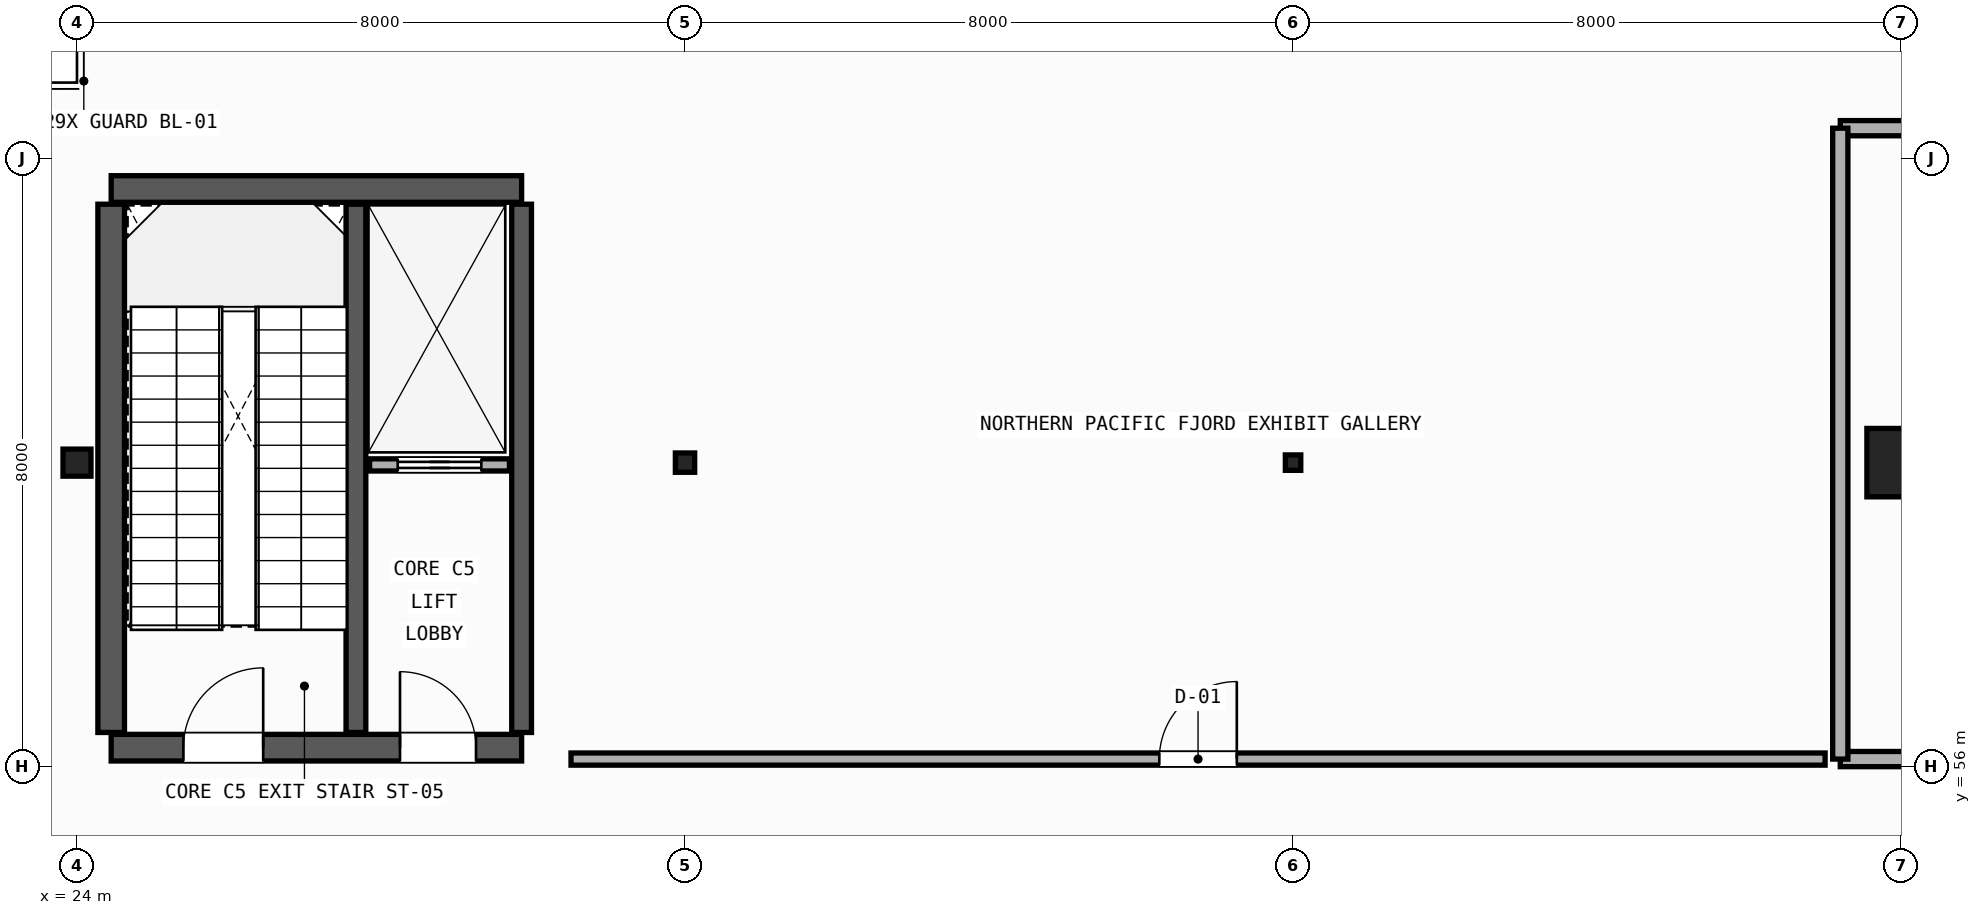
"""IFC4 building model, lengths in metres.
Left out: names, types, materials, properties, quantities, classifications, styles, units other than length and angle.
Written with IfcOpenShell. Run it as: python <this file> out.ifc"""

import sys

from ifc_helpers import new_model, si_unit, direction, frame, frame_2d, origin, origin_2d, place, context, subcontext, project, spatial, rectangle, hollow_rectangle, i_section, extrude, element, fill, save


model = new_model("IFC4")
c1 = context("Model", 3, precision=1e-05, world=origin(), true_north=direction((0.0, 1.0)))
c2 = subcontext(c1, "Body", "Model", "MODEL_VIEW")
j1 = project(units=[si_unit("LENGTHUNIT", "METRE"), si_unit("PLANEANGLEUNIT", "RADIAN")], contexts=[c1])
p1 = place(None, origin())
s1 = spatial("IfcSite", under=j1, at=p1, CompositionType="ELEMENT")
p2 = place(p1, origin())
s2 = spatial("IfcBuilding", under=s1, at=p2, CompositionType="ELEMENT")
p3 = place(p2, frame((0.0, 0.0, 5.4)))
s3 = spatial("IfcBuildingStorey", under=s2, at=p3, CompositionType="ELEMENT", Elevation=5.4)
p4 = place(p3, frame((24.0, 60.0, 0.0), z_axis=(0.0, 0.0, 1.0), x_axis=(1.0, 0.0, 0.0)))
e1 = element("IfcColumn", 1, at=p4, inside=s3, PredefinedType="COLUMN", context=c2, shape_type="SweptSolid", body=[
    extrude(i_section(OverallWidth=0.368, OverallDepth=0.356, WebThickness=0.011, FlangeThickness=0.018, FilletRadius=0.015, at=origin_2d()), origin(), (0.0, 0.0, 1.0), 4.56),
])
p5 = place(p3, frame((32.0, 60.0, 0.0), z_axis=(0.0, 0.0, 1.0), x_axis=(0.0, 1.0, 0.0)))
e2 = element("IfcColumn", 2, at=p5, inside=s3, PredefinedType="COLUMN", context=c2, shape_type="SweptSolid", body=[
    extrude(i_section(OverallWidth=0.254, OverallDepth=0.254, WebThickness=0.009, FlangeThickness=0.014, FilletRadius=0.011, at=origin_2d()), origin(), (0.0, 0.0, 1.0), 4.56),
])
p6 = place(p3, frame((40.0, 60.0, 0.0), z_axis=(0.0, 0.0, 1.0), x_axis=(1.0, 0.0, 0.0)))
e3 = element("IfcColumn", 3, at=p6, inside=s3, PredefinedType="COLUMN", context=c2, shape_type="SweptSolid", body=[
    extrude(hollow_rectangle(XDim=0.203, YDim=0.203, WallThickness=0.009, InnerFilletRadius=0.009, OuterFilletRadius=0.018, at=origin_2d()), origin(), (0.0, 0.0, 1.0), 4.56),
])
p7 = place(p3, frame((48.0, 60.0, 0.0), z_axis=(0.0, 0.0, 1.0), x_axis=(0.0, 1.0, 0.0)))
e4 = element("IfcColumn", 4, at=p7, inside=s3, PredefinedType="COLUMN", context=c2, shape_type="SweptSolid", body=[
    extrude(rectangle(XDim=0.9, YDim=0.9, at=origin_2d()), origin(), (0.0, 0.0, 1.0), 4.56),
])
p8 = place(p3, frame((24.45, 56.25, 0.0), z_axis=(0.0, 0.0, 1.0), x_axis=(1.0, 0.0, 0.0)))
e5 = element("IfcWall", 5, at=p8, inside=s3, PredefinedType="SHEAR", context=c2, shape_type="SweptSolid", body=[
    extrude(rectangle(XDim=5.4, YDim=0.35, at=frame_2d((2.7, 0.0))), origin(), (0.0, 0.0, 1.0), 4.55),
])
p9 = place(p8, frame((0.95, 0.0, 0.0)))
e6 = element("IfcOpeningElement", 6, at=p9, cuts=e5, PredefinedType="OPENING", context=c2, shape_type="SweptSolid", body=[
    extrude(rectangle(XDim=1.05, YDim=2.1, at=frame_2d((0.525, 1.05))), frame((0.0, 0.185, 0.0), z_axis=(0.0, -1.0, 0.0), x_axis=(1.0, 0.0, 0.0)), (0.0, 0.0, 1.0), 0.37),
])
p10 = place(p8, frame((3.8, 0.0, 0.0)))
e7 = element("IfcOpeningElement", 7, at=p10, cuts=e5, PredefinedType="OPENING", context=c2, shape_type="SweptSolid", body=[
    extrude(rectangle(XDim=1.0, YDim=2.15, at=frame_2d((0.5, 1.075))), frame((0.0, 0.185, 0.0), z_axis=(0.0, -1.0, 0.0), x_axis=(1.0, 0.0, 0.0)), (0.0, 0.0, 1.0), 0.37),
])
p11 = place(p3, frame((24.45, 63.6, 0.0), z_axis=(0.0, 0.0, 1.0), x_axis=(1.0, 0.0, 0.0)))
e8 = element("IfcWall", 8, at=p11, inside=s3, PredefinedType="SHEAR", context=c2, shape_type="SweptSolid", body=[
    extrude(rectangle(XDim=5.4, YDim=0.35, at=frame_2d((2.7, 0.0))), origin(), (0.0, 0.0, 1.0), 4.55),
])
p12 = place(p3, frame((24.45, 56.45, 0.0), z_axis=(0.0, 0.0, 1.0), x_axis=(0.0, 1.0, 0.0)))
e9 = element("IfcWall", 9, at=p12, inside=s3, PredefinedType="SHEAR", context=c2, shape_type="SweptSolid", body=[
    extrude(rectangle(XDim=6.95, YDim=0.35, at=frame_2d((3.475, 0.0))), origin(), (0.0, 0.0, 1.0), 4.55),
])
for number, where, z_axis, x_axis in (
    (10, (29.85, 56.45, 0.0), (0.0, 0.0, 1.0), (0.0, 1.0, 0.0)),
    (11, (27.67, 56.45, 0.0), (0.0, 0.0, 1.0), (0.0, 1.0, 0.0)),
):
    element("IfcWall", number, at=place(p3, frame(where, z_axis=z_axis, x_axis=x_axis)), inside=s3, PredefinedType="SHEAR", context=c2, shape_type="SweptSolid", body=[
        extrude(rectangle(XDim=6.95, YDim=0.26, at=frame_2d((3.475, 0.0))), origin(), (0.0, 0.0, 1.0), 4.55),
    ])
p13 = place(p3, frame((27.85, 59.97, 0.0), z_axis=(0.0, 0.0, 1.0), x_axis=(1.0, 0.0, 0.0)))
e12 = element("IfcWall", 12, at=p13, inside=s3, PredefinedType="PARTITIONING", context=c2, shape_type="SweptSolid", body=[
    extrude(rectangle(XDim=1.84, YDim=0.16, at=frame_2d((0.92, 0.0))), origin(), (0.0, 0.0, 1.0), 3.6),
])
p14 = place(p13, frame((0.37, 0.0, 0.0)))
e13 = element("IfcOpeningElement", 13, at=p14, cuts=e12, PredefinedType="OPENING", context=c2, shape_type="SweptSolid", body=[
    extrude(rectangle(XDim=1.1, YDim=2.15, at=frame_2d((0.55, 1.075))), frame((0.0, 0.09, 0.0), z_axis=(0.0, -1.0, 0.0), x_axis=(1.0, 0.0, 0.0)), (0.0, 0.0, 1.0), 0.18),
])
p15 = place(p3, frame((30.5, 56.1, 0.0), z_axis=(0.0, 0.0, 1.0), x_axis=(1.0, 0.0, 0.0)))
e14 = element("IfcWall", 14, at=p15, inside=s3, PredefinedType="PARTITIONING", context=c2, shape_type="SweptSolid", body=[
    extrude(rectangle(XDim=16.5, YDim=0.16, at=frame_2d((8.25, 0.0))), origin(), (0.0, 0.0, 1.0), 3.758),
])
p16 = place(p15, frame((7.74, 0.0, 0.0)))
e15 = element("IfcOpeningElement", 15, at=p16, cuts=e14, PredefinedType="OPENING", context=c2, shape_type="SweptSolid", body=[
    extrude(rectangle(XDim=1.02, YDim=2.15, at=frame_2d((0.51, 1.075))), frame((0.0, 0.09, 0.0), z_axis=(0.0, -1.0, 0.0), x_axis=(1.0, 0.0, 0.0)), (0.0, 0.0, 1.0), 0.18),
])
p17 = place(p3, frame((47.2, 56.1, 0.0), z_axis=(0.0, 0.0, 1.0), x_axis=(1.0, 0.0, 0.0)))
e16 = element("IfcWall", 16, at=p17, inside=s3, PredefinedType="PLUMBINGWALL", context=c2, shape_type="SweptSolid", body=[
    extrude(rectangle(XDim=7.8, YDim=0.2, at=frame_2d((3.9, 0.0))), origin(), (0.0, 0.0, 1.0), 3.837),
])
p18 = place(p17, frame((3.445, 0.0, 0.0)))
e17 = element("IfcOpeningElement", 17, at=p18, cuts=e16, PredefinedType="OPENING", context=c2, shape_type="SweptSolid", body=[
    extrude(rectangle(XDim=0.91, YDim=2.1, at=frame_2d((0.455, 1.05))), frame((0.0, 0.11, 0.0), z_axis=(0.0, -1.0, 0.0), x_axis=(1.0, 0.0, 0.0)), (0.0, 0.0, 1.0), 0.22),
])
p19 = place(p3, frame((47.2, 64.4, 0.0), z_axis=(0.0, 0.0, 1.0), x_axis=(1.0, 0.0, 0.0)))
e18 = element("IfcWall", 18, at=p19, inside=s3, PredefinedType="PLUMBINGWALL", context=c2, shape_type="SweptSolid", body=[
    extrude(rectangle(XDim=7.8, YDim=0.2, at=frame_2d((3.9, 0.0))), origin(), (0.0, 0.0, 1.0), 3.842),
])
p20 = place(p3, frame((47.2, 56.1, 0.0), z_axis=(0.0, 0.0, 1.0), x_axis=(0.0, 1.0, 0.0)))
e19 = element("IfcWall", 19, at=p20, inside=s3, PredefinedType="PLUMBINGWALL", context=c2, shape_type="SweptSolid", body=[
    extrude(rectangle(XDim=8.3, YDim=0.2, at=frame_2d((4.15, 0.0))), origin(), (0.0, 0.0, 1.0), 3.758),
])
p21 = place(p14, origin())
e20 = element("IfcDoor", 20, at=p21, inside=s3, OperationType="SLIDING_TO_LEFT", PredefinedType="DOOR", context=c2, shape_type="SweptSolid", body=[
    extrude(rectangle(XDim=1.1, YDim=2.15, at=frame_2d((0.55, 1.075))), frame((0.0, 0.025, 0.0), z_axis=(0.0, -1.0, 0.0), x_axis=(1.0, 0.0, 0.0)), (0.0, 0.0, 1.0), 0.05),
])
fill(e13, e20)
p22 = place(p9, origin())
e21 = element("IfcDoor", 21, at=p22, inside=s3, OperationType="SINGLE_SWING_RIGHT", PredefinedType="DOOR", context=c2, shape_type="SweptSolid", body=[
    extrude(rectangle(XDim=1.05, YDim=2.1, at=frame_2d((0.525, 1.05))), frame((0.0, 0.025, 0.0), z_axis=(0.0, -1.0, 0.0), x_axis=(1.0, 0.0, 0.0)), (0.0, 0.0, 1.0), 0.05),
])
fill(e6, e21)
p23 = place(p10, origin())
e22 = element("IfcDoor", 22, at=p23, inside=s3, OperationType="SINGLE_SWING_LEFT", PredefinedType="DOOR", context=c2, shape_type="SweptSolid", body=[
    extrude(rectangle(XDim=1.0, YDim=2.15, at=frame_2d((0.5, 1.075))), frame((0.0, 0.025, 0.0), z_axis=(0.0, -1.0, 0.0), x_axis=(1.0, 0.0, 0.0)), (0.0, 0.0, 1.0), 0.05),
])
fill(e7, e22)
p24 = place(p16, origin())
e23 = element("IfcDoor", 23, at=p24, inside=s3, OperationType="SINGLE_SWING_RIGHT", PredefinedType="DOOR", context=c2, shape_type="SweptSolid", body=[
    extrude(rectangle(XDim=1.02, YDim=2.15, at=frame_2d((0.51, 1.075))), frame((0.0, 0.025, 0.0), z_axis=(0.0, -1.0, 0.0), x_axis=(1.0, 0.0, 0.0)), (0.0, 0.0, 1.0), 0.05),
])
fill(e15, e23)
save(model, sys.argv[1])
